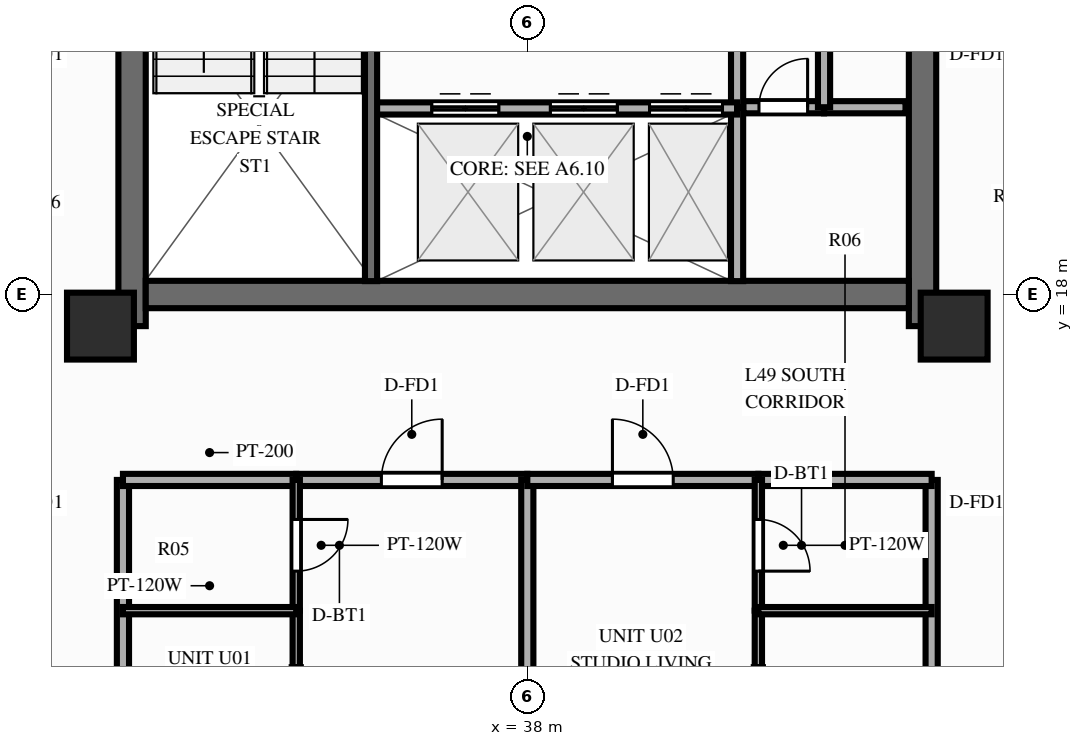
"""IFC4 building model, lengths in metres.
Left out: names, types, materials, properties, quantities, classifications, styles, units other than length and angle.
Written with IfcOpenShell. Run it as: python <this file> out.ifc"""

import sys

from ifc_helpers import new_model, si_unit, direction, frame, frame_2d, origin, origin_2d, place, context, subcontext, project, spatial, rectangle, extrude, source, transform, mapped, element, fill, save


model = new_model("IFC4")
c1 = context("Model", 3, precision=1e-05, world=origin(), true_north=direction((0.0, 1.0)))
c2 = subcontext(c1, "Body", "Model", "MODEL_VIEW")
j1 = project(units=[si_unit("LENGTHUNIT", "METRE"), si_unit("PLANEANGLEUNIT", "RADIAN")], contexts=[c1])
p1 = place(None, origin())
s1 = spatial("IfcSite", under=j1, at=p1, CompositionType="ELEMENT")
p2 = place(p1, origin())
s2 = spatial("IfcBuilding", under=s1, at=p2, CompositionType="ELEMENT")
p3 = place(p2, frame((0.0, 0.0, 156.1)))
s3 = spatial("IfcBuildingStorey", under=s2, at=p3, CompositionType="ELEMENT", Elevation=156.1)
p4 = place(p3, frame((31.5, 17.48, 0.0), z_axis=(0.0, 0.0, 1.0), x_axis=(0.0, 1.0, 0.0)))
e1 = element("IfcWall", 1, at=p4, inside=s3, PredefinedType="SHEAR", context=c2, shape_type="SweptSolid", body=[
    extrude(rectangle(XDim=19.04, YDim=0.45, at=frame_2d((9.52, 0.0))), origin(), (0.0, 0.0, 1.0), 3.0),
])
p5 = place(p4, frame((6.32, 0.0, 0.0)))
e2 = element("IfcOpeningElement", 2, at=p5, cuts=e1, PredefinedType="OPENING", context=c2, shape_type="SweptSolid", body=[
    extrude(rectangle(XDim=1.1, YDim=2.15, at=frame_2d((0.55, 1.075))), frame((0.0, 0.237, 0.0), z_axis=(0.0, -1.0, 0.0), x_axis=(1.0, 0.0, 0.0)), (0.0, 0.0, 1.0), 0.474),
])
p6 = place(p3, frame((44.5, 17.48, 0.0), z_axis=(0.0, 0.0, 1.0), x_axis=(0.0, 1.0, 0.0)))
e3 = element("IfcWall", 3, at=p6, inside=s3, PredefinedType="SHEAR", context=c2, shape_type="SweptSolid", body=[
    extrude(rectangle(XDim=19.04, YDim=0.45, at=frame_2d((9.52, 0.0))), origin(), (0.0, 0.0, 1.0), 3.0),
])
p7 = place(p6, frame((12.67, 0.0, 0.0), z_axis=(0.0, 0.0, 1.0), x_axis=(-1.0, 0.0, 0.0)))
e4 = element("IfcOpeningElement", 4, at=p7, cuts=e3, PredefinedType="OPENING", context=c2, shape_type="SweptSolid", body=[
    extrude(rectangle(XDim=1.1, YDim=2.15, at=frame_2d((0.55, 1.075))), frame((0.0, 0.237, 0.0), z_axis=(0.0, -1.0, 0.0), x_axis=(1.0, 0.0, 0.0)), (0.0, 0.0, 1.0), 0.474),
])
p8 = place(p3, frame((31.725, 18.0, 0.0), z_axis=(0.0, 0.0, 1.0), x_axis=(1.0, 0.0, 0.0)))
e5 = element("IfcWall", 5, at=p8, inside=s3, PredefinedType="SHEAR", context=c2, shape_type="SweptSolid", body=[
    extrude(rectangle(XDim=12.55, YDim=0.45, at=frame_2d((6.275, 0.0))), origin(), (0.0, 0.0, 1.0), 3.0),
])
m1 = source(origin(), c2, "Body", "SweptSolid", [
    extrude(rectangle(XDim=1.1, YDim=1.1, at=origin_2d()), origin(), (0.0, 0.0, 1.0), 3.0),
])
for number, where, z_axis, x_axis in (
    (6, (30.98, 17.48, 0.0), (0.0, 0.0, 1.0), (1.0, 0.0, 0.0)),
    (7, (45.02, 17.48, 0.0), (0.0, 0.0, 1.0), (1.0, 0.0, 0.0)),
):
    element("IfcColumn", number, at=place(p3, frame(where, z_axis=z_axis, x_axis=x_axis)), inside=s3, PredefinedType="COLUMN", context=c2, shape_type="MappedRepresentation", body=[
        mapped(m1, transform((0.0, 0.0, 0.0), scale=1.0)),
    ])
p9 = place(p3, frame((41.55, 21.08, 0.0), z_axis=(0.0, 0.0, 1.0), x_axis=(1.0, 0.0, 0.0)))
e8 = element("IfcWall", 8, at=p9, inside=s3, PredefinedType="PARTITIONING", context=c2, shape_type="SweptSolid", body=[
    extrude(rectangle(XDim=1.33, YDim=0.2, at=frame_2d((0.665, 0.0))), origin(), (0.0, 0.0, 1.0), 2.79),
])
p10 = place(p9, frame((0.26, 0.0, 0.0)))
e9 = element("IfcOpeningElement", 9, at=p10, cuts=e8, PredefinedType="OPENING", context=c2, shape_type="SweptSolid", body=[
    extrude(rectangle(XDim=0.8, YDim=2.05, at=frame_2d((0.4, 1.025))), frame((0.0, 0.112, 0.0), z_axis=(0.0, -1.0, 0.0), x_axis=(1.0, 0.0, 0.0)), (0.0, 0.0, 1.0), 0.224),
])
p11 = place(p3, frame((42.88, 21.08, 0.0), z_axis=(0.0, 0.0, 1.0), x_axis=(1.0, 0.0, 0.0)))
e10 = element("IfcWall", 10, at=p11, inside=s3, PredefinedType="PARTITIONING", context=c2, shape_type="SweptSolid", body=[
    extrude(rectangle(XDim=1.34, YDim=0.2, at=frame_2d((0.67, 0.0))), origin(), (0.0, 0.0, 1.0), 2.79),
])
p12 = place(p3, frame((42.88, 21.08, 0.0), z_axis=(0.0, 0.0, 1.0), x_axis=(0.0, 1.0, 0.0)))
e11 = element("IfcWall", 11, at=p12, inside=s3, PredefinedType="PARTITIONING", context=c2, shape_type="SweptSolid", body=[
    extrude(rectangle(XDim=7.47, YDim=0.2, at=frame_2d((3.735, 0.0))), origin(), (0.0, 0.0, 1.0), 2.79),
])
p13 = place(p12, frame((3.2, 0.0, 0.0)))
e12 = element("IfcOpeningElement", 12, at=p13, cuts=e11, PredefinedType="OPENING", context=c2, shape_type="SweptSolid", body=[
    extrude(rectangle(XDim=0.9, YDim=2.1, at=frame_2d((0.45, 1.05))), frame((0.0, 0.112, 0.0), z_axis=(0.0, -1.0, 0.0), x_axis=(1.0, 0.0, 0.0)), (0.0, 0.0, 1.0), 0.224),
])
p14 = place(p3, frame((41.45, 18.22, 0.0), z_axis=(0.0, 0.0, 1.0), x_axis=(0.0, 1.0, 0.0)))
e13 = element("IfcWall", 13, at=p14, inside=s3, PredefinedType="PARTITIONING", context=c2, shape_type="SweptSolid", body=[
    extrude(rectangle(XDim=2.86, YDim=0.2, at=frame_2d((1.43, 0.0))), origin(), (0.0, 0.0, 1.0), 2.79),
])
p15 = place(p3, frame((41.45, 21.08, 0.0), z_axis=(0.0, 0.0, 1.0), x_axis=(0.0, 1.0, 0.0)))
e14 = element("IfcWall", 14, at=p15, inside=s3, PredefinedType="PARTITIONING", context=c2, shape_type="SweptSolid", body=[
    extrude(rectangle(XDim=7.52, YDim=0.2, at=frame_2d((3.76, 0.0))), origin(), (0.0, 0.0, 1.0), 2.79),
])
p16 = place(p15, frame((2.8, 0.0, 0.0)))
e15 = element("IfcOpeningElement", 15, at=p16, cuts=e14, PredefinedType="OPENING", context=c2, shape_type="SweptSolid", body=[
    extrude(rectangle(XDim=0.9, YDim=2.1, at=frame_2d((0.45, 1.05))), frame((0.0, 0.112, 0.0), z_axis=(0.0, -1.0, 0.0), x_axis=(1.0, 0.0, 0.0)), (0.0, 0.0, 1.0), 0.224),
])
p17 = place(p3, frame((35.43, 21.06, 0.0), z_axis=(0.0, 0.0, 1.0), x_axis=(1.0, 0.0, 0.0)))
e16 = element("IfcWall", 16, at=p17, inside=s3, PredefinedType="PARTITIONING", context=c2, shape_type="SweptSolid", body=[
    extrude(rectangle(XDim=6.02, YDim=0.2, at=frame_2d((3.01, 0.0))), origin(), (0.0, 0.0, 1.0), 2.79),
])
p18 = place(p17, frame((1.0, 0.0, 0.0)))
e17 = element("IfcOpeningElement", 17, at=p18, cuts=e16, PredefinedType="OPENING", context=c2, shape_type="SweptSolid", body=[
    extrude(rectangle(XDim=1.1, YDim=2.15, at=frame_2d((0.55, 1.075))), frame((0.0, 0.112, 0.0), z_axis=(0.0, -1.0, 0.0), x_axis=(1.0, 0.0, 0.0)), (0.0, 0.0, 1.0), 0.224),
])
p19 = place(p17, frame((2.95, 0.0, 0.0)))
e18 = element("IfcOpeningElement", 18, at=p19, cuts=e16, PredefinedType="OPENING", context=c2, shape_type="SweptSolid", body=[
    extrude(rectangle(XDim=1.1, YDim=2.15, at=frame_2d((0.55, 1.075))), frame((0.0, 0.112, 0.0), z_axis=(0.0, -1.0, 0.0), x_axis=(1.0, 0.0, 0.0)), (0.0, 0.0, 1.0), 0.224),
])
p20 = place(p17, frame((4.58, 0.0, 0.0)))
e19 = element("IfcOpeningElement", 19, at=p20, cuts=e16, PredefinedType="OPENING", context=c2, shape_type="SweptSolid", body=[
    extrude(rectangle(XDim=1.2, YDim=2.15, at=frame_2d((0.6, 1.075))), frame((0.0, 0.112, 0.0), z_axis=(0.0, -1.0, 0.0), x_axis=(1.0, 0.0, 0.0)), (0.0, 0.0, 1.0), 0.224),
])
p21 = place(p3, frame((35.43, 18.22, 0.0), z_axis=(0.0, 0.0, 1.0), x_axis=(0.0, 1.0, 0.0)))
e20 = element("IfcWall", 20, at=p21, inside=s3, PredefinedType="SOLIDWALL", context=c2, shape_type="SweptSolid", body=[
    extrude(rectangle(XDim=7.22, YDim=0.2, at=frame_2d((3.61, 0.0))), origin(), (0.0, 0.0, 1.0), 2.79),
])
p22 = place(p21, frame((6.68, 0.0, 0.0), z_axis=(0.0, 0.0, 1.0), x_axis=(-1.0, 0.0, 0.0)))
e21 = element("IfcOpeningElement", 21, at=p22, cuts=e20, PredefinedType="OPENING", context=c2, shape_type="SweptSolid", body=[
    extrude(rectangle(XDim=1.1, YDim=2.15, at=frame_2d((0.55, 1.075))), frame((0.0, 0.112, 0.0), z_axis=(0.0, -1.0, 0.0), x_axis=(1.0, 0.0, 0.0)), (0.0, 0.0, 1.0), 0.224),
])
for number, where, z_axis, x_axis in (
    (22, (31.35, 14.95, 0.0), (0.0, 0.0, 1.0), (0.0, -1.0, 0.0)),
    (23, (44.65, 14.95, 0.0), (0.0, 0.0, 1.0), (0.0, -1.0, 0.0)),
):
    element("IfcWall", number, at=place(p3, frame(where, z_axis=z_axis, x_axis=x_axis)), inside=s3, PredefinedType="PARTITIONING", context=c2, shape_type="SweptSolid", body=[
        extrude(rectangle(XDim=8.8, YDim=0.2, at=frame_2d((4.4, 0.0))), origin(), (0.0, 0.0, 1.0), 2.34),
    ])
p23 = place(p3, frame((31.35, 14.95, 0.0), z_axis=(0.0, 0.0, 1.0), x_axis=(1.0, 0.0, 0.0)))
e24 = element("IfcWall", 24, at=p23, inside=s3, PredefinedType="PARTITIONING", context=c2, shape_type="SweptSolid", body=[
    extrude(rectangle(XDim=2.85, YDim=0.2, at=frame_2d((1.425, 0.0))), origin(), (0.0, 0.0, 1.0), 2.79),
])
p24 = place(p3, frame((34.2, 14.95, 0.0), z_axis=(0.0, 0.0, 1.0), x_axis=(1.0, 0.0, 0.0)))
e25 = element("IfcWall", 25, at=p24, inside=s3, PredefinedType="PARTITIONING", context=c2, shape_type="SweptSolid", body=[
    extrude(rectangle(XDim=3.8, YDim=0.2, at=frame_2d((1.9, 0.0))), origin(), (0.0, 0.0, 1.0), 2.79),
])
p25 = place(p24, frame((1.4, 0.0, 0.0)))
e26 = element("IfcOpeningElement", 26, at=p25, cuts=e25, PredefinedType="OPENING", context=c2, shape_type="SweptSolid", body=[
    extrude(rectangle(XDim=1.0, YDim=2.15, at=frame_2d((0.5, 1.075))), frame((0.0, 0.112, 0.0), z_axis=(0.0, -1.0, 0.0), x_axis=(1.0, 0.0, 0.0)), (0.0, 0.0, 1.0), 0.224),
])
p26 = place(p3, frame((34.2, 14.95, 0.0), z_axis=(0.0, 0.0, 1.0), x_axis=(0.0, -1.0, 0.0)))
e27 = element("IfcWall", 27, at=p26, inside=s3, PredefinedType="PARTITIONING", context=c2, shape_type="SweptSolid", body=[
    extrude(rectangle(XDim=2.15, YDim=0.12, at=frame_2d((1.075, 0.0))), origin(), (0.0, 0.0, 1.0), 2.79),
])
p27 = place(p26, frame((0.65, 0.0, 0.0)))
e28 = element("IfcOpeningElement", 28, at=p27, cuts=e27, PredefinedType="OPENING", context=c2, shape_type="SweptSolid", body=[
    extrude(rectangle(XDim=0.85, YDim=2.05, at=frame_2d((0.425, 1.025))), frame((0.0, 0.072, 0.0), z_axis=(0.0, -1.0, 0.0), x_axis=(1.0, 0.0, 0.0)), (0.0, 0.0, 1.0), 0.144),
])
p28 = place(p3, frame((34.2, 12.8, 0.0), z_axis=(0.0, 0.0, 1.0), x_axis=(0.0, -1.0, 0.0)))
e29 = element("IfcWall", 29, at=p28, inside=s3, PredefinedType="PARTITIONING", context=c2, shape_type="SweptSolid", body=[
    extrude(rectangle(XDim=0.93, YDim=0.12, at=frame_2d((0.465, 0.0))), origin(), (0.0, 0.0, 1.0), 2.79),
])
p29 = place(p3, frame((31.35, 12.8, 0.0), z_axis=(0.0, 0.0, 1.0), x_axis=(1.0, 0.0, 0.0)))
e30 = element("IfcWall", 30, at=p29, inside=s3, PredefinedType="PARTITIONING", context=c2, shape_type="SweptSolid", body=[
    extrude(rectangle(XDim=2.85, YDim=0.12, at=frame_2d((1.425, 0.0))), origin(), (0.0, 0.0, 1.0), 2.79),
])
p30 = place(p3, frame((38.0, 14.95, 0.0), z_axis=(0.0, 0.0, 1.0), x_axis=(0.0, -1.0, 0.0)))
e31 = element("IfcWall", 31, at=p30, inside=s3, PredefinedType="PARTITIONING", context=c2, shape_type="SweptSolid", body=[
    extrude(rectangle(XDim=8.8, YDim=0.2, at=frame_2d((4.4, 0.0))), origin(), (0.0, 0.0, 1.0), 2.79),
])
p31 = place(p3, frame((38.0, 14.95, 0.0), z_axis=(0.0, 0.0, 1.0), x_axis=(1.0, 0.0, 0.0)))
e32 = element("IfcWall", 32, at=p31, inside=s3, PredefinedType="PARTITIONING", context=c2, shape_type="SweptSolid", body=[
    extrude(rectangle(XDim=3.8, YDim=0.2, at=frame_2d((1.9, 0.0))), origin(), (0.0, 0.0, 1.0), 2.79),
])
p32 = place(p31, frame((1.4, 0.0, 0.0)))
e33 = element("IfcOpeningElement", 33, at=p32, cuts=e32, PredefinedType="OPENING", context=c2, shape_type="SweptSolid", body=[
    extrude(rectangle(XDim=1.0, YDim=2.15, at=frame_2d((0.5, 1.075))), frame((0.0, 0.112, 0.0), z_axis=(0.0, -1.0, 0.0), x_axis=(1.0, 0.0, 0.0)), (0.0, 0.0, 1.0), 0.224),
])
p33 = place(p3, frame((41.8, 14.95, 0.0), z_axis=(0.0, 0.0, 1.0), x_axis=(1.0, 0.0, 0.0)))
e34 = element("IfcWall", 34, at=p33, inside=s3, PredefinedType="PARTITIONING", context=c2, shape_type="SweptSolid", body=[
    extrude(rectangle(XDim=2.85, YDim=0.2, at=frame_2d((1.425, 0.0))), origin(), (0.0, 0.0, 1.0), 2.79),
])
p34 = place(p3, frame((41.8, 14.95, 0.0), z_axis=(0.0, 0.0, 1.0), x_axis=(0.0, -1.0, 0.0)))
e35 = element("IfcWall", 35, at=p34, inside=s3, PredefinedType="PARTITIONING", context=c2, shape_type="SweptSolid", body=[
    extrude(rectangle(XDim=2.15, YDim=0.12, at=frame_2d((1.075, 0.0))), origin(), (0.0, 0.0, 1.0), 2.79),
])
p35 = place(p34, frame((0.65, 0.0, 0.0)))
e36 = element("IfcOpeningElement", 36, at=p35, cuts=e35, PredefinedType="OPENING", context=c2, shape_type="SweptSolid", body=[
    extrude(rectangle(XDim=0.85, YDim=2.05, at=frame_2d((0.425, 1.025))), frame((0.0, 0.072, 0.0), z_axis=(0.0, -1.0, 0.0), x_axis=(1.0, 0.0, 0.0)), (0.0, 0.0, 1.0), 0.144),
])
p36 = place(p3, frame((41.8, 12.8, 0.0), z_axis=(0.0, 0.0, 1.0), x_axis=(0.0, -1.0, 0.0)))
e37 = element("IfcWall", 37, at=p36, inside=s3, PredefinedType="PARTITIONING", context=c2, shape_type="SweptSolid", body=[
    extrude(rectangle(XDim=0.93, YDim=0.12, at=frame_2d((0.465, 0.0))), origin(), (0.0, 0.0, 1.0), 2.79),
])
p37 = place(p3, frame((41.8, 12.8, 0.0), z_axis=(0.0, 0.0, 1.0), x_axis=(1.0, 0.0, 0.0)))
e38 = element("IfcWall", 38, at=p37, inside=s3, PredefinedType="PARTITIONING", context=c2, shape_type="SweptSolid", body=[
    extrude(rectangle(XDim=2.85, YDim=0.12, at=frame_2d((1.425, 0.0))), origin(), (0.0, 0.0, 1.0), 2.79),
])
m2 = source(origin(), c2, "Body", "SweptSolid", [
    extrude(rectangle(XDim=0.8, YDim=2.05, at=frame_2d((0.4, 1.025))), frame((0.0, 0.025, 0.0), z_axis=(0.0, -1.0, 0.0), x_axis=(1.0, 0.0, 0.0)), (0.0, 0.0, 1.0), 0.05),
])
p38 = place(p10, origin())
e39 = element("IfcDoor", 39, at=p38, inside=s3, OperationType="SINGLE_SWING_RIGHT", PredefinedType="DOOR", context=c2, shape_type="MappedRepresentation", body=[
    mapped(m2, transform((0.0, 0.0, 0.0), scale=1.0)),
])
fill(e9, e39)
m3 = source(origin(), c2, "Body", "SweptSolid", [
    extrude(rectangle(XDim=1.1, YDim=2.15, at=frame_2d((0.55, 1.075))), frame((0.0, 0.025, 0.0), z_axis=(0.0, -1.0, 0.0), x_axis=(1.0, 0.0, 0.0)), (0.0, 0.0, 1.0), 0.05),
])
p39 = place(p18, origin())
e40 = element("IfcDoor", 40, at=p39, inside=s3, OperationType="DOUBLE_DOOR_SLIDING", PredefinedType="DOOR", context=c2, shape_type="MappedRepresentation", body=[
    mapped(m3, transform((0.0, 0.0, 0.0), scale=1.0)),
])
fill(e17, e40)
p40 = place(p19, origin())
e41 = element("IfcDoor", 41, at=p40, inside=s3, OperationType="DOUBLE_DOOR_SLIDING", PredefinedType="DOOR", context=c2, shape_type="MappedRepresentation", body=[
    mapped(m3, transform((0.0, 0.0, 0.0), scale=1.0)),
])
fill(e18, e41)
m4 = source(origin(), c2, "Body", "SweptSolid", [
    extrude(rectangle(XDim=1.2, YDim=2.15, at=frame_2d((0.6, 1.075))), frame((0.0, 0.025, 0.0), z_axis=(0.0, -1.0, 0.0), x_axis=(1.0, 0.0, 0.0)), (0.0, 0.0, 1.0), 0.05),
])
p41 = place(p20, origin())
e42 = element("IfcDoor", 42, at=p41, inside=s3, OperationType="DOUBLE_DOOR_SLIDING", PredefinedType="DOOR", context=c2, shape_type="MappedRepresentation", body=[
    mapped(m4, transform((0.0, 0.0, 0.0), scale=1.0)),
])
fill(e19, e42)
m5 = source(origin(), c2, "Body", "SweptSolid", [
    extrude(rectangle(XDim=1.0, YDim=2.15, at=frame_2d((0.5, 1.075))), frame((0.0, 0.025, 0.0), z_axis=(0.0, -1.0, 0.0), x_axis=(1.0, 0.0, 0.0)), (0.0, 0.0, 1.0), 0.05),
])
p42 = place(p25, origin())
e43 = element("IfcDoor", 43, at=p42, inside=s3, OperationType="SINGLE_SWING_RIGHT", PredefinedType="DOOR", context=c2, shape_type="MappedRepresentation", body=[
    mapped(m5, transform((0.0, 0.0, 0.0), scale=1.0)),
])
fill(e26, e43)
m6 = source(origin(), c2, "Body", "SweptSolid", [
    extrude(rectangle(XDim=0.85, YDim=2.05, at=frame_2d((0.425, 1.025))), frame((0.0, 0.025, 0.0), z_axis=(0.0, -1.0, 0.0), x_axis=(1.0, 0.0, 0.0)), (0.0, 0.0, 1.0), 0.05),
])
p43 = place(p27, origin())
e44 = element("IfcDoor", 44, at=p43, inside=s3, OperationType="SINGLE_SWING_LEFT", PredefinedType="DOOR", context=c2, shape_type="MappedRepresentation", body=[
    mapped(m6, transform((0.0, 0.0, 0.0), scale=1.0)),
])
fill(e28, e44)
p44 = place(p32, origin())
e45 = element("IfcDoor", 45, at=p44, inside=s3, OperationType="SINGLE_SWING_LEFT", PredefinedType="DOOR", context=c2, shape_type="MappedRepresentation", body=[
    mapped(m5, transform((0.0, 0.0, 0.0), scale=1.0)),
])
fill(e33, e45)
p45 = place(p35, origin())
e46 = element("IfcDoor", 46, at=p45, inside=s3, OperationType="SINGLE_SWING_RIGHT", PredefinedType="DOOR", context=c2, shape_type="MappedRepresentation", body=[
    mapped(m6, transform((0.0, 0.0, 0.0), scale=1.0)),
])
fill(e36, e46)
save(model, sys.argv[1])
